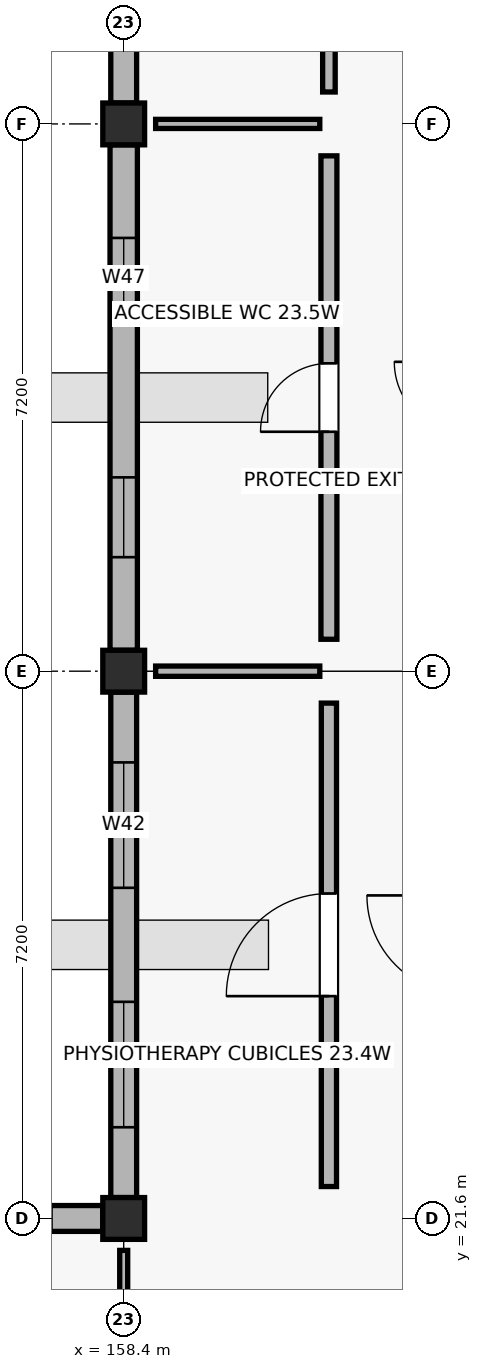
"""IFC4 building model, lengths in metres.
Left out: names, types, materials, properties, quantities, classifications, styles, units other than length and angle.
Written with IfcOpenShell. Run it as: python <this file> out.ifc"""

import sys

from ifc_helpers import new_model, si_unit, direction, frame, frame_2d, origin, origin_2d, place, context, subcontext, project, spatial, rectangle, extrude, element, fill, save


model = new_model("IFC4")
c1 = context("Model", 3, precision=1e-05, world=origin(), true_north=direction((0.0, 1.0)))
c2 = subcontext(c1, "Body", "Model", "MODEL_VIEW")
j1 = project(units=[si_unit("LENGTHUNIT", "METRE"), si_unit("PLANEANGLEUNIT", "RADIAN")], contexts=[c1])
p1 = place(None, origin())
s1 = spatial("IfcSite", under=j1, at=p1, CompositionType="ELEMENT")
p2 = place(p1, origin())
s2 = spatial("IfcBuilding", under=s1, at=p2, CompositionType="ELEMENT")
p3 = place(p2, origin())
s3 = spatial("IfcBuildingStorey", under=s2, at=p3, CompositionType="ELEMENT", Elevation=0.0)
for number, where, z_axis, x_axis in (
    (1, (158.4, 21.6, -0.25), (0.0, 0.0, 1.0), (1.0, 0.0, 0.0)),
    (2, (158.4, 28.8, -0.25), (0.0, 0.0, 1.0), (1.0, 0.0, 0.0)),
    (3, (158.4, 36.0, -0.25), (0.0, 0.0, 1.0), (1.0, 0.0, 0.0)),
):
    element("IfcColumn", number, at=place(p3, frame(where, z_axis=z_axis, x_axis=x_axis)), inside=s3, PredefinedType="COLUMN", context=c2, shape_type="SweptSolid", body=[
        extrude(rectangle(XDim=0.55, YDim=0.55, at=origin_2d()), origin(), (0.0, 0.0, 1.0), 4.75),
    ])
p4 = place(p3, frame((158.125, 21.6, 0.0), z_axis=(0.0, 0.0, 1.0), x_axis=(-1.0, 0.0, 0.0)))
e4 = element("IfcWall", 4, at=p4, inside=s3, PredefinedType="SOLIDWALL", context=c2, shape_type="SweptSolid", body=[
    extrude(rectangle(XDim=6.65, YDim=0.34, at=frame_2d((3.325, 0.0))), origin(), (0.0, 0.0, 1.0), 3.47),
])
p5 = place(p4, frame((0.675, 0.0, 0.9)))
e5 = element("IfcOpeningElement", 5, at=p5, cuts=e4, PredefinedType="OPENING", context=c2, shape_type="SweptSolid", body=[
    extrude(rectangle(XDim=2.15, YDim=1.38, at=frame_2d((1.075, 0.69))), frame((0.0, 0.18, 0.0), z_axis=(0.0, -1.0, 0.0), x_axis=(1.0, 0.0, 0.0)), (0.0, 0.0, 1.0), 0.36),
])
p6 = place(p4, frame((3.825, 0.0, 0.9)))
e6 = element("IfcOpeningElement", 6, at=p6, cuts=e4, PredefinedType="OPENING", context=c2, shape_type="SweptSolid", body=[
    extrude(rectangle(XDim=2.15, YDim=1.38, at=frame_2d((1.075, 0.69))), frame((0.0, 0.18, 0.0), z_axis=(0.0, -1.0, 0.0), x_axis=(1.0, 0.0, 0.0)), (0.0, 0.0, 1.0), 0.36),
])
p7 = place(p3, frame((158.4, 28.525, 0.0), z_axis=(0.0, 0.0, 1.0), x_axis=(0.0, -1.0, 0.0)))
e7 = element("IfcWall", 7, at=p7, inside=s3, PredefinedType="SOLIDWALL", context=c2, shape_type="SweptSolid", body=[
    extrude(rectangle(XDim=6.65, YDim=0.34, at=frame_2d((3.325, 0.0))), origin(), (0.0, 0.0, 1.0), 3.52),
])
p8 = place(p7, frame((0.925, 0.0, 0.9)))
e8 = element("IfcOpeningElement", 8, at=p8, cuts=e7, PredefinedType="OPENING", context=c2, shape_type="SweptSolid", body=[
    extrude(rectangle(XDim=1.65, YDim=1.75, at=frame_2d((0.825, 0.875))), frame((0.0, 0.18, 0.0), z_axis=(0.0, -1.0, 0.0), x_axis=(1.0, 0.0, 0.0)), (0.0, 0.0, 1.0), 0.36),
])
p9 = place(p7, frame((4.075, 0.0, 0.9)))
e9 = element("IfcOpeningElement", 9, at=p9, cuts=e7, PredefinedType="OPENING", context=c2, shape_type="SweptSolid", body=[
    extrude(rectangle(XDim=1.65, YDim=1.75, at=frame_2d((0.825, 0.875))), frame((0.0, 0.18, 0.0), z_axis=(0.0, -1.0, 0.0), x_axis=(1.0, 0.0, 0.0)), (0.0, 0.0, 1.0), 0.36),
])
p10 = place(p3, frame((158.4, 35.725, 0.0), z_axis=(0.0, 0.0, 1.0), x_axis=(0.0, -1.0, 0.0)))
e10 = element("IfcWall", 10, at=p10, inside=s3, PredefinedType="SOLIDWALL", context=c2, shape_type="SweptSolid", body=[
    extrude(rectangle(XDim=6.65, YDim=0.36, at=frame_2d((3.325, 0.0))), origin(), (0.0, 0.0, 1.0), 3.52),
])
p11 = place(p10, frame((1.225, 0.0, 0.9)))
e11 = element("IfcOpeningElement", 11, at=p11, cuts=e10, PredefinedType="OPENING", context=c2, shape_type="SweptSolid", body=[
    extrude(rectangle(XDim=1.05, YDim=1.88, at=frame_2d((0.525, 0.94))), frame((0.0, 0.19, 0.0), z_axis=(0.0, -1.0, 0.0), x_axis=(1.0, 0.0, 0.0)), (0.0, 0.0, 1.0), 0.38),
])
p12 = place(p10, frame((4.375, 0.0, 0.9)))
e12 = element("IfcOpeningElement", 12, at=p12, cuts=e10, PredefinedType="OPENING", context=c2, shape_type="SweptSolid", body=[
    extrude(rectangle(XDim=1.05, YDim=1.88, at=frame_2d((0.525, 0.94))), frame((0.0, 0.19, 0.0), z_axis=(0.0, -1.0, 0.0), x_axis=(1.0, 0.0, 0.0)), (0.0, 0.0, 1.0), 0.38),
])
p13 = place(p3, frame((158.4, 42.925, 0.0), z_axis=(0.0, 0.0, 1.0), x_axis=(0.0, -1.0, 0.0)))
e13 = element("IfcWall", 13, at=p13, inside=s3, PredefinedType="SOLIDWALL", context=c2, shape_type="SweptSolid", body=[
    extrude(rectangle(XDim=6.65, YDim=0.34, at=frame_2d((3.325, 0.0))), origin(), (0.0, 0.0, 1.0), 3.52),
])
p14 = place(p13, frame((0.85, 0.0, 0.9)))
e14 = element("IfcOpeningElement", 14, at=p14, cuts=e13, PredefinedType="OPENING", context=c2, shape_type="SweptSolid", body=[
    extrude(rectangle(XDim=1.8, YDim=1.88, at=frame_2d((0.9, 0.94))), frame((0.0, 0.18, 0.0), z_axis=(0.0, -1.0, 0.0), x_axis=(1.0, 0.0, 0.0)), (0.0, 0.0, 1.0), 0.36),
])
p15 = place(p13, frame((4.0, 0.0, 0.9)))
e15 = element("IfcOpeningElement", 15, at=p15, cuts=e13, PredefinedType="OPENING", context=c2, shape_type="SweptSolid", body=[
    extrude(rectangle(XDim=1.8, YDim=1.88, at=frame_2d((0.9, 0.94))), frame((0.0, 0.18, 0.0), z_axis=(0.0, -1.0, 0.0), x_axis=(1.0, 0.0, 0.0)), (0.0, 0.0, 1.0), 0.36),
])
p16 = place(p3, frame((158.4, 19.14, 0.0), z_axis=(0.0, 0.0, 1.0), x_axis=(0.0, 1.0, 0.0)))
e16 = element("IfcWall", 16, at=p16, inside=s3, PredefinedType="PARTITIONING", context=c2, shape_type="SweptSolid", body=[
    extrude(rectangle(XDim=2.04, YDim=0.105, at=frame_2d((1.02, 0.0))), origin(), (0.0, 0.0, 1.0), 3.36),
])
p17 = place(p3, frame((161.1, 22.02, 0.0), z_axis=(0.0, 0.0, 1.0), x_axis=(0.0, 1.0, 0.0)))
e17 = element("IfcWall", 17, at=p17, inside=s3, PredefinedType="SOLIDWALL", context=c2, shape_type="SweptSolid", body=[
    extrude(rectangle(XDim=6.36, YDim=0.2, at=frame_2d((3.18, 0.0))), origin(), (0.0, 0.0, 1.0), 3.36),
])
p18 = place(p17, frame((2.505, 0.0, 0.0)))
e18 = element("IfcOpeningElement", 18, at=p18, cuts=e17, PredefinedType="OPENING", context=c2, shape_type="SweptSolid", body=[
    extrude(rectangle(XDim=1.35, YDim=2.2, at=frame_2d((0.675, 1.1))), frame((0.0, 0.11, 0.0), z_axis=(0.0, -1.0, 0.0), x_axis=(1.0, 0.0, 0.0)), (0.0, 0.0, 1.0), 0.22),
])
p19 = place(p3, frame((158.82, 28.8, 0.0), z_axis=(0.0, 0.0, 1.0), x_axis=(1.0, 0.0, 0.0)))
e19 = element("IfcWall", 19, at=p19, inside=s3, PredefinedType="PARTITIONING", context=c2, shape_type="SweptSolid", body=[
    extrude(rectangle(XDim=2.16, YDim=0.135, at=frame_2d((1.08, 0.0))), origin(), (0.0, 0.0, 1.0), 3.36),
])
p20 = place(p3, frame((161.1, 29.22, 0.0), z_axis=(0.0, 0.0, 1.0), x_axis=(0.0, 1.0, 0.0)))
e20 = element("IfcWall", 20, at=p20, inside=s3, PredefinedType="PLUMBINGWALL", context=c2, shape_type="SweptSolid", body=[
    extrude(rectangle(XDim=6.36, YDim=0.21, at=frame_2d((3.18, 0.0))), origin(), (0.0, 0.0, 1.0), 3.36),
])
p21 = place(p20, frame((2.73, 0.0, 0.0)))
e21 = element("IfcOpeningElement", 21, at=p21, cuts=e20, PredefinedType="OPENING", context=c2, shape_type="SweptSolid", body=[
    extrude(rectangle(XDim=0.9, YDim=2.04, at=frame_2d((0.45, 1.02))), frame((0.0, 0.115, 0.0), z_axis=(0.0, -1.0, 0.0), x_axis=(1.0, 0.0, 0.0)), (0.0, 0.0, 1.0), 0.23),
])
p22 = place(p3, frame((158.82, 36.0, 0.0), z_axis=(0.0, 0.0, 1.0), x_axis=(1.0, 0.0, 0.0)))
e22 = element("IfcWall", 22, at=p22, inside=s3, PredefinedType="PARTITIONING", context=c2, shape_type="SweptSolid", body=[
    extrude(rectangle(XDim=2.16, YDim=0.12, at=frame_2d((1.08, 0.0))), origin(), (0.0, 0.0, 1.0), 3.36),
])
p23 = place(p3, frame((161.1, 36.42, 0.0), z_axis=(0.0, 0.0, 1.0), x_axis=(0.0, 1.0, 0.0)))
e23 = element("IfcWall", 23, at=p23, inside=s3, PredefinedType="PARTITIONING", context=c2, shape_type="SweptSolid", body=[
    extrude(rectangle(XDim=6.36, YDim=0.165, at=frame_2d((3.18, 0.0))), origin(), (0.0, 0.0, 1.0), 3.36),
])
p24 = place(p23, frame((2.69, 0.0, 0.0)))
e24 = element("IfcOpeningElement", 24, at=p24, cuts=e23, PredefinedType="OPENING", context=c2, shape_type="SweptSolid", body=[
    extrude(rectangle(XDim=0.98, YDim=2.04, at=frame_2d((0.49, 1.02))), frame((0.0, 0.093, 0.0), z_axis=(0.0, -1.0, 0.0), x_axis=(1.0, 0.0, 0.0)), (0.0, 0.0, 1.0), 0.185),
])
p25 = place(p8, origin())
e25 = element("IfcWindow", 25, at=p25, inside=s3, PartitioningType="SINGLE_PANEL", PredefinedType="WINDOW", context=c2, shape_type="SweptSolid", body=[
    extrude(rectangle(XDim=1.65, YDim=1.75, at=frame_2d((0.825, 0.875))), frame((0.0, 0.03, 0.0), z_axis=(0.0, -1.0, 0.0), x_axis=(1.0, 0.0, 0.0)), (0.0, 0.0, 1.0), 0.06),
])
fill(e8, e25)
p26 = place(p9, origin())
e26 = element("IfcWindow", 26, at=p26, inside=s3, PartitioningType="SINGLE_PANEL", PredefinedType="WINDOW", context=c2, shape_type="SweptSolid", body=[
    extrude(rectangle(XDim=1.65, YDim=1.75, at=frame_2d((0.825, 0.875))), frame((0.0, 0.03, 0.0), z_axis=(0.0, -1.0, 0.0), x_axis=(1.0, 0.0, 0.0)), (0.0, 0.0, 1.0), 0.06),
])
fill(e9, e26)
p27 = place(p11, origin())
e27 = element("IfcWindow", 27, at=p27, inside=s3, PartitioningType="SINGLE_PANEL", PredefinedType="WINDOW", context=c2, shape_type="SweptSolid", body=[
    extrude(rectangle(XDim=1.05, YDim=1.88, at=frame_2d((0.525, 0.94))), frame((0.0, 0.03, 0.0), z_axis=(0.0, -1.0, 0.0), x_axis=(1.0, 0.0, 0.0)), (0.0, 0.0, 1.0), 0.06),
])
fill(e11, e27)
p28 = place(p12, origin())
e28 = element("IfcWindow", 28, at=p28, inside=s3, PartitioningType="SINGLE_PANEL", PredefinedType="WINDOW", context=c2, shape_type="SweptSolid", body=[
    extrude(rectangle(XDim=1.05, YDim=1.88, at=frame_2d((0.525, 0.94))), frame((0.0, 0.03, 0.0), z_axis=(0.0, -1.0, 0.0), x_axis=(1.0, 0.0, 0.0)), (0.0, 0.0, 1.0), 0.06),
])
fill(e12, e28)
p29 = place(p18, origin())
e29 = element("IfcDoor", 29, at=p29, inside=s3, OperationType="SINGLE_SWING_LEFT", PredefinedType="DOOR", context=c2, shape_type="SweptSolid", body=[
    extrude(rectangle(XDim=1.35, YDim=2.2, at=frame_2d((0.675, 1.1))), frame((0.0, 0.025, 0.0), z_axis=(0.0, -1.0, 0.0), x_axis=(1.0, 0.0, 0.0)), (0.0, 0.0, 1.0), 0.05),
])
fill(e18, e29)
p30 = place(p21, origin())
e30 = element("IfcDoor", 30, at=p30, inside=s3, OperationType="SINGLE_SWING_LEFT", PredefinedType="DOOR", context=c2, shape_type="SweptSolid", body=[
    extrude(rectangle(XDim=0.9, YDim=2.04, at=frame_2d((0.45, 1.02))), frame((0.0, 0.025, 0.0), z_axis=(0.0, -1.0, 0.0), x_axis=(1.0, 0.0, 0.0)), (0.0, 0.0, 1.0), 0.05),
])
fill(e21, e30)
save(model, sys.argv[1])
